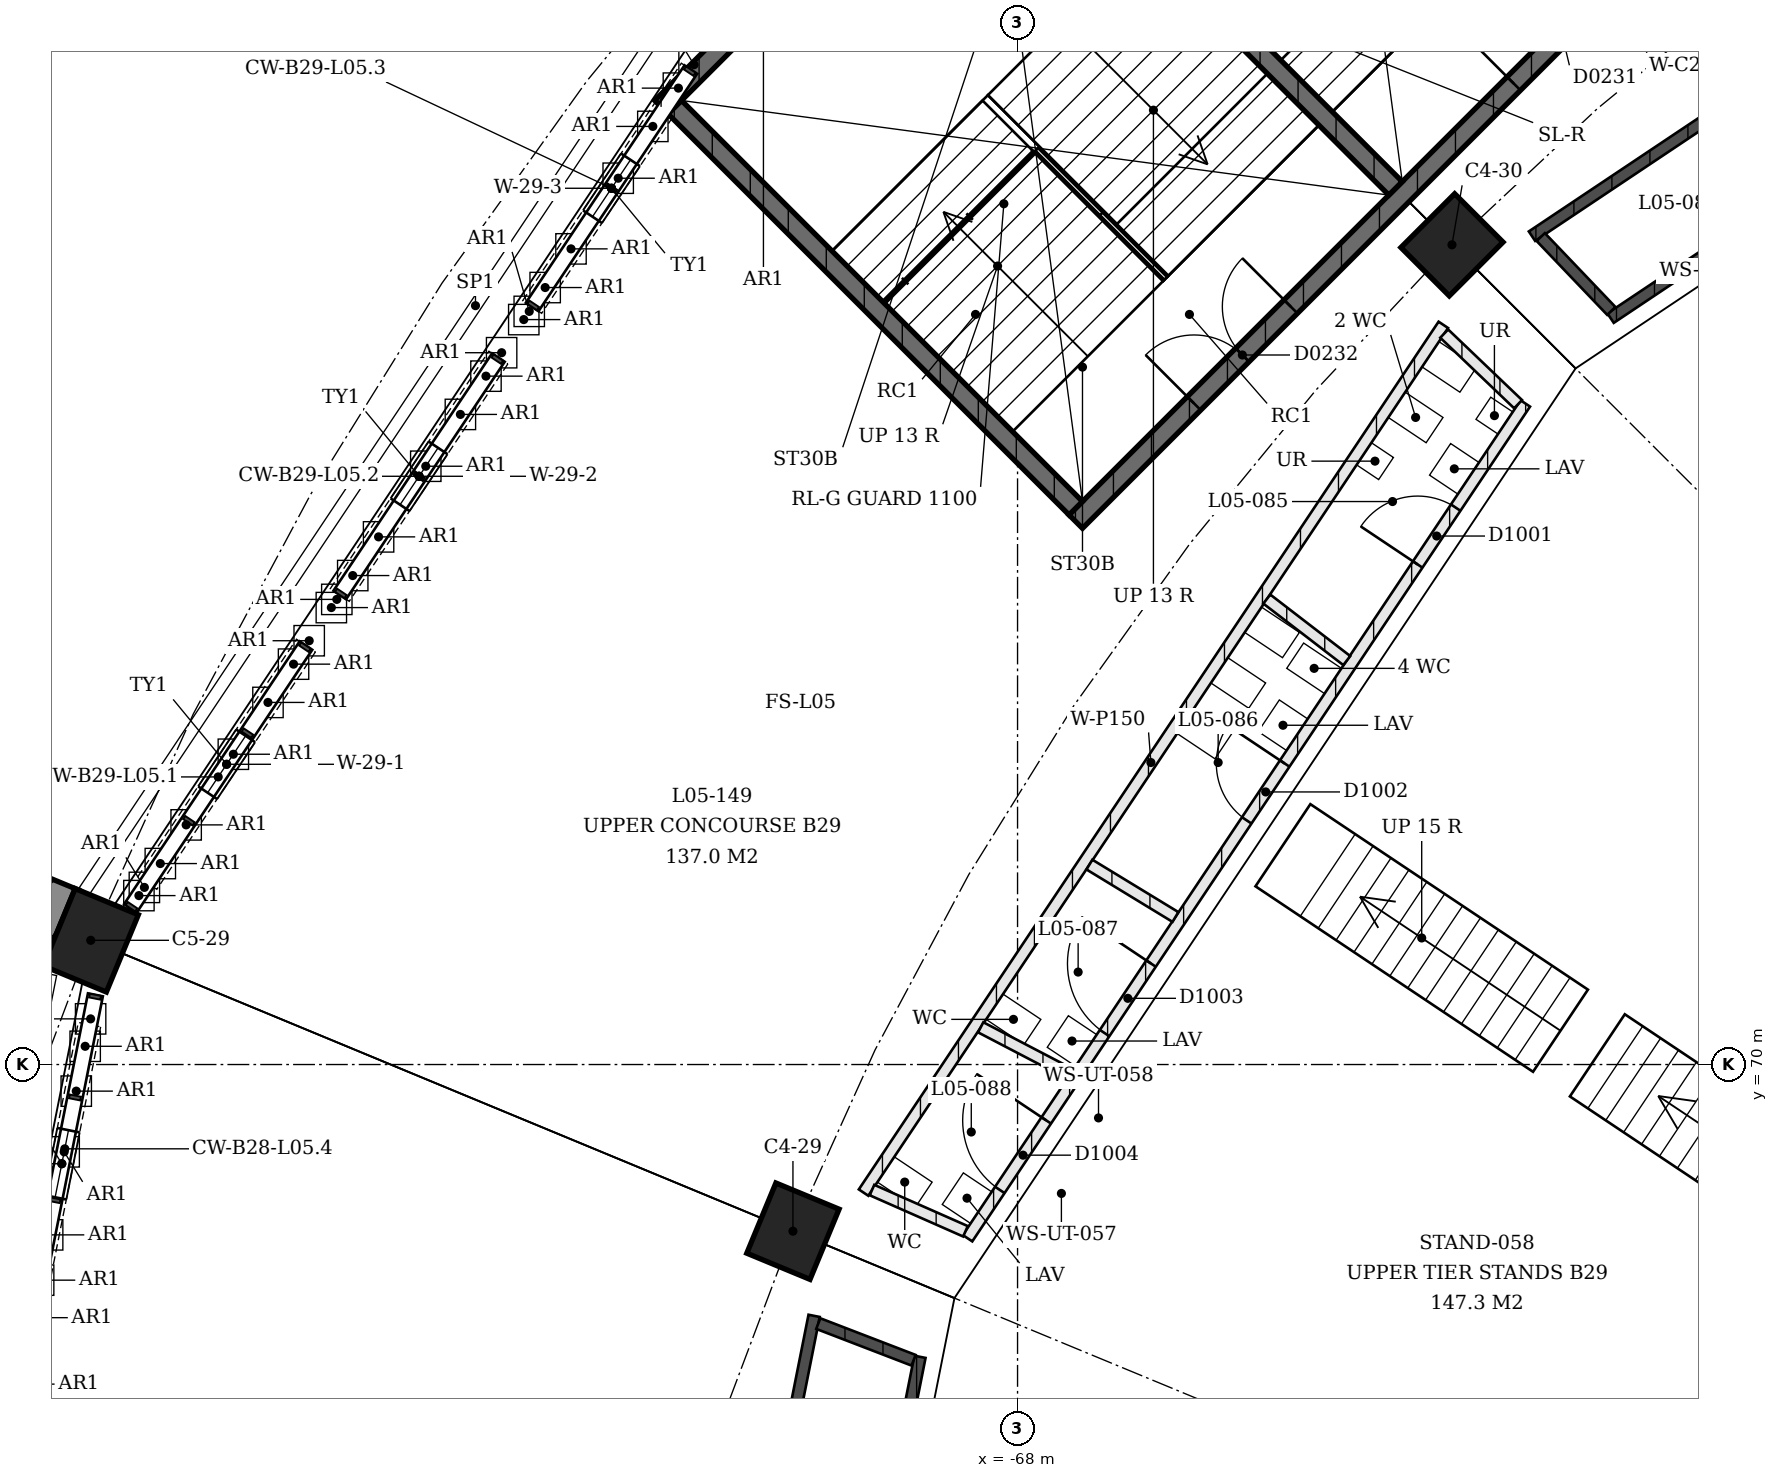
"""IFC4 building model, lengths in metres.
Left out: names, types, materials, properties, quantities, classifications, styles, units other than length and angle.
Written with IfcOpenShell. Run it as: python <this file> out.ifc"""

import sys

from ifc_helpers import new_model, si_unit, direction, frame, frame_2d, origin, origin_2d, place, context, subcontext, project, spatial, polyline, rectangle, outline, extrude, element, fill, save


model = new_model("IFC4")
c1 = context("Model", 3, precision=1e-05, world=origin(), true_north=direction((0.0, 1.0)))
c2 = subcontext(c1, "Body", "Model", "MODEL_VIEW")
j1 = project(units=[si_unit("LENGTHUNIT", "METRE"), si_unit("PLANEANGLEUNIT", "RADIAN")], contexts=[c1])
p1 = place(None, origin())
s1 = spatial("IfcSite", under=j1, at=p1, CompositionType="ELEMENT")
p2 = place(p1, origin())
s2 = spatial("IfcBuilding", under=s1, at=p2, CompositionType="ELEMENT")
p3 = place(p2, frame((0.0, 0.0, 22.5)))
s3 = spatial("IfcBuildingStorey", under=s2, at=p3, CompositionType="ELEMENT", Elevation=22.5)
p4 = place(p3, frame((-70.955, 67.807, 0.0), z_axis=(0.0, 0.0, 1.0), x_axis=(-0.382683432365, -0.923879532511, 0.0)))
e1 = element("IfcColumn", 1, at=p4, inside=s3, PredefinedType="COLUMN", context=c2, shape_type="SweptSolid", body=[
    extrude(rectangle(XDim=1.0, YDim=0.9, at=origin_2d()), origin(), (0.0, 0.0, 1.0), 6.5),
])
p5 = place(p3, frame((-80.194, 71.634, 0.0), z_axis=(0.0, 0.0, 1.0), x_axis=(-0.382683432365, -0.923879532511, 0.0)))
e2 = element("IfcColumn", 2, at=p5, inside=s3, PredefinedType="COLUMN", context=c2, shape_type="SweptSolid", body=[
    extrude(rectangle(XDim=1.1, YDim=0.9, at=origin_2d()), origin(), (0.0, 0.0, 1.0), 6.5),
])
p6 = place(p3, frame((-62.284, 80.784, 0.0), z_axis=(0.0, 0.0, 1.0), x_axis=(-0.707106781187, -0.707106781187, 0.0)))
e3 = element("IfcColumn", 3, at=p6, inside=s3, PredefinedType="COLUMN", context=c2, shape_type="SweptSolid", body=[
    extrude(rectangle(XDim=1.0, YDim=0.9, at=origin_2d()), origin(), (0.0, 0.0, 1.0), 6.5),
])
p7 = place(p3, frame((-80.939, 66.865, 4.1), z_axis=(0.0, 0.0, 1.0), x_axis=(0.19509691132, 0.980783969686, 0.0)))
e4 = element("IfcWall", 4, at=p7, inside=s3, PredefinedType="SOLIDWALL", context=c2, shape_type="SweptSolid", body=[
    extrude(outline(polyline([(0.0, 0.0), (3.732, 0.0), (3.732, 0.05), (3.61, 1.31), (3.249, 2.575), (2.661, 3.752), (1.866, 4.8), (1.071, 3.752), (0.483, 2.575), (0.122, 1.31), (0.0, 0.05), (0.0, 0.0)])), frame((0.0, 0.15, 0.0), z_axis=(0.0, -1.0, 0.0), x_axis=(1.0, 0.0, 0.0)), (0.0, 0.0, 1.0), 0.3),
])
p8 = place(p7, frame((1.416, 0.0, 0.4)))
e5 = element("IfcOpeningElement", 5, at=p8, cuts=e4, PredefinedType="OPENING", context=c2, shape_type="SweptSolid", body=[
    extrude(rectangle(XDim=0.9, YDim=3.6, at=frame_2d((0.45, 1.8))), frame((0.0, 0.16, 0.0), z_axis=(0.0, -1.0, 0.0), x_axis=(1.0, 0.0, 0.0)), (0.0, 0.0, 1.0), 0.32),
])
p9 = place(p3, frame((-79.45, 72.388, 4.1), z_axis=(0.0, 0.0, 1.0), x_axis=(0.555599628384, 0.831449970196, 0.0)))
e6 = element("IfcWall", 6, at=p9, inside=s3, PredefinedType="SOLIDWALL", context=c2, shape_type="SweptSolid", body=[
    extrude(outline(polyline([(0.0, 0.0), (3.757, 0.0), (3.757, 0.05), (3.635, 1.311), (3.271, 2.577), (2.678, 3.754), (1.879, 4.8), (1.079, 3.754), (0.486, 2.577), (0.123, 1.311), (0.0, 0.05), (0.0, 0.0)])), frame((0.0, 0.15, 0.0), z_axis=(0.0, -1.0, 0.0), x_axis=(1.0, 0.0, 0.0)), (0.0, 0.0, 1.0), 0.3),
])
p10 = place(p9, frame((1.428, 0.0, 0.4)))
e7 = element("IfcOpeningElement", 7, at=p10, cuts=e6, PredefinedType="OPENING", context=c2, shape_type="SweptSolid", body=[
    extrude(rectangle(XDim=0.9, YDim=3.6, at=frame_2d((0.45, 1.8))), frame((0.0, 0.16, 0.0), z_axis=(0.0, -1.0, 0.0), x_axis=(1.0, 0.0, 0.0)), (0.0, 0.0, 1.0), 0.32),
])
p11 = place(p3, frame((-76.918, 76.177, 4.1), z_axis=(0.0, 0.0, 1.0), x_axis=(0.555599628384, 0.831449970196, 0.0)))
e8 = element("IfcWall", 8, at=p11, inside=s3, PredefinedType="SOLIDWALL", context=c2, shape_type="SweptSolid", body=[
    extrude(outline(polyline([(0.0, 0.0), (3.757, 0.0), (3.757, 0.05), (3.635, 1.311), (3.271, 2.577), (2.678, 3.754), (1.879, 4.8), (1.079, 3.754), (0.486, 2.577), (0.123, 1.311), (0.0, 0.05), (0.0, 0.0)])), frame((0.0, 0.15, 0.0), z_axis=(0.0, -1.0, 0.0), x_axis=(1.0, 0.0, 0.0)), (0.0, 0.0, 1.0), 0.3),
])
p12 = place(p11, frame((1.428, 0.0, 0.4)))
e9 = element("IfcOpeningElement", 9, at=p12, cuts=e8, PredefinedType="OPENING", context=c2, shape_type="SweptSolid", body=[
    extrude(rectangle(XDim=0.9, YDim=3.6, at=frame_2d((0.45, 1.8))), frame((0.0, 0.16, 0.0), z_axis=(0.0, -1.0, 0.0), x_axis=(1.0, 0.0, 0.0)), (0.0, 0.0, 1.0), 0.32),
])
p13 = place(p3, frame((-74.386, 79.966, 4.1), z_axis=(0.0, 0.0, 1.0), x_axis=(0.555599628384, 0.831449970196, 0.0)))
e10 = element("IfcWall", 10, at=p13, inside=s3, PredefinedType="SOLIDWALL", context=c2, shape_type="SweptSolid", body=[
    extrude(outline(polyline([(0.0, 0.0), (3.757, 0.0), (3.757, 0.05), (3.635, 1.311), (3.271, 2.577), (2.678, 3.754), (1.879, 4.8), (1.079, 3.754), (0.486, 2.577), (0.123, 1.311), (0.0, 0.05), (0.0, 0.0)])), frame((0.0, 0.15, 0.0), z_axis=(0.0, -1.0, 0.0), x_axis=(1.0, 0.0, 0.0)), (0.0, 0.0, 1.0), 0.3),
])
p14 = place(p13, frame((1.428, 0.0, 0.4)))
e11 = element("IfcOpeningElement", 11, at=p14, cuts=e10, PredefinedType="OPENING", context=c2, shape_type="SweptSolid", body=[
    extrude(rectangle(XDim=0.9, YDim=3.6, at=frame_2d((0.45, 1.8))), frame((0.0, 0.16, 0.0), z_axis=(0.0, -1.0, 0.0), x_axis=(1.0, 0.0, 0.0)), (0.0, 0.0, 1.0), 0.32),
])
p15 = place(p3, frame((-58.643, 85.734, 0.0), z_axis=(0.0, 0.0, 1.0), x_axis=(-0.707106781187, -0.707106781187, 0.0)))
e12 = element("IfcWall", 12, at=p15, inside=s3, PredefinedType="SHEAR", context=c2, shape_type="SweptSolid", body=[
    extrude(rectangle(XDim=12.15, YDim=0.25, at=frame_2d((6.075, 0.0))), origin(), (0.0, 0.0, 1.0), 2.1),
])
p16 = place(p15, frame((2.2, 0.0, 0.0)))
e13 = element("IfcOpeningElement", 13, at=p16, cuts=e12, PredefinedType="OPENING", context=c2, shape_type="SweptSolid", body=[
    extrude(rectangle(XDim=1.8, YDim=2.1, at=frame_2d((0.9, 1.05))), frame((0.0, 0.125, 0.0), z_axis=(0.0, -1.0, 0.0), x_axis=(1.0, 0.0, 0.0)), (0.0, 0.0, 1.0), 0.25),
])
p17 = place(p15, frame((8.15, 0.0, 0.0)))
e14 = element("IfcOpeningElement", 14, at=p17, cuts=e12, PredefinedType="OPENING", context=c2, shape_type="SweptSolid", body=[
    extrude(rectangle(XDim=1.8, YDim=2.1, at=frame_2d((0.9, 1.05))), frame((0.0, 0.125, 0.0), z_axis=(0.0, -1.0, 0.0), x_axis=(1.0, 0.0, 0.0)), (0.0, 0.0, 1.0), 0.25),
])
p18 = place(p3, frame((-64.094, 91.186, 0.0), z_axis=(0.0, 0.0, 1.0), x_axis=(-0.707106781187, -0.707106781187, 0.0)))
e15 = element("IfcWall", 15, at=p18, inside=s3, PredefinedType="SHEAR", context=c2, shape_type="SweptSolid", body=[
    extrude(rectangle(XDim=12.15, YDim=0.25, at=frame_2d((6.075, 0.0))), origin(), (0.0, 0.0, 1.0), 2.1),
])
p19 = place(p3, frame((-67.234, 77.319, 0.0), z_axis=(0.0, 0.0, 1.0), x_axis=(-0.707090417709, 0.707123144286, 0.0)))
e16 = element("IfcWall", 16, at=p19, inside=s3, PredefinedType="SHEAR", context=c2, shape_type="SweptSolid", body=[
    extrude(rectangle(XDim=7.46, YDim=0.25, at=frame_2d((3.73, 0.0))), origin(), (0.0, 0.0, 1.0), 2.1),
])
p20 = place(p3, frame((-63.027, 81.527, 0.0), z_axis=(0.0, 0.0, 1.0), x_axis=(-0.707106781187, 0.707106781187, 0.0)))
e17 = element("IfcWall", 17, at=p20, inside=s3, PredefinedType="SHEAR", context=c2, shape_type="SweptSolid", body=[
    extrude(rectangle(XDim=7.46, YDim=0.25, at=frame_2d((3.73, 0.0))), origin(), (0.0, 0.0, 1.0), 2.1),
])
p21 = place(p3, frame((-71.842, 53.293, 0.0), z_axis=(0.0, 0.0, 1.0), x_axis=(0.195095631841, 0.980784224198, 0.0)))
e18 = element("IfcWall", 18, at=p21, inside=s3, PredefinedType="SOLIDWALL", context=c2, shape_type="SweptSolid", body=[
    extrude(rectangle(XDim=13.113, YDim=0.15, at=frame_2d((6.557, 0.0))), origin(), (0.0, 0.0, 1.0), 3.0),
])
p22 = place(p21, frame((2.815, 0.0, 0.0)))
e19 = element("IfcOpeningElement", 19, at=p22, cuts=e18, PredefinedType="OPENING", context=c2, shape_type="SweptSolid", body=[
    extrude(rectangle(XDim=1.0, YDim=2.1, at=frame_2d((0.5, 1.05))), frame((0.0, 0.075, 0.0), z_axis=(0.0, -1.0, 0.0), x_axis=(1.0, 0.0, 0.0)), (0.0, 0.0, 1.0), 0.15),
])
p23 = place(p21, frame((9.298, 0.0, 0.0)))
e20 = element("IfcOpeningElement", 20, at=p23, cuts=e18, PredefinedType="OPENING", context=c2, shape_type="SweptSolid", body=[
    extrude(rectangle(XDim=1.0, YDim=2.1, at=frame_2d((0.5, 1.05))), frame((0.0, 0.075, 0.0), z_axis=(0.0, -1.0, 0.0), x_axis=(1.0, 0.0, 0.0)), (0.0, 0.0, 1.0), 0.15),
])
p24 = place(p3, frame((-73.336, 53.325, 0.0), z_axis=(0.0, 0.0, 1.0), x_axis=(0.195086146928, 0.980786110871, 0.0)))
e21 = element("IfcWall", 21, at=p24, inside=s3, PredefinedType="SOLIDWALL", context=c2, shape_type="SweptSolid", body=[
    extrude(rectangle(XDim=13.631, YDim=0.15, at=frame_2d((6.815, 0.0))), origin(), (0.0, 0.0, 1.0), 3.0),
])
p25 = place(p3, frame((-69.368, 66.109, 0.0), z_axis=(0.0, 0.0, 1.0), x_axis=(-0.933331557443, 0.359015603953, 0.0)))
e22 = element("IfcWall", 22, at=p25, inside=s3, PredefinedType="SOLIDWALL", context=c2, shape_type="SweptSolid", body=[
    extrude(rectangle(XDim=1.344, YDim=0.15, at=frame_2d((0.672, 0.0))), origin(), (0.0, 0.0, 1.0), 3.0),
])
p26 = place(p3, frame((-61.32, 78.697, 0.0), z_axis=(0.0, 0.0, 1.0), x_axis=(-0.555570028225, -0.831469749142, 0.0)))
e23 = element("IfcWall", 23, at=p26, inside=s3, PredefinedType="PARTITIONING", context=c2, shape_type="SweptSolid", body=[
    extrude(rectangle(XDim=13.209, YDim=0.15, at=frame_2d((6.604, 0.0))), origin(), (0.0, 0.0, 1.0), 3.0),
])
p27 = place(p26, frame((1.648, 0.0, 0.0)))
e24 = element("IfcOpeningElement", 24, at=p27, cuts=e23, PredefinedType="OPENING", context=c2, shape_type="SweptSolid", body=[
    extrude(rectangle(XDim=0.9, YDim=2.1, at=frame_2d((0.45, 1.05))), frame((0.0, 0.075, 0.0), z_axis=(0.0, -1.0, 0.0), x_axis=(1.0, 0.0, 0.0)), (0.0, 0.0, 1.0), 0.15),
])
p28 = place(p26, frame((5.697, 0.0, 0.0)))
e25 = element("IfcOpeningElement", 25, at=p28, cuts=e23, PredefinedType="OPENING", context=c2, shape_type="SweptSolid", body=[
    extrude(rectangle(XDim=0.9, YDim=2.1, at=frame_2d((0.45, 1.05))), frame((0.0, 0.075, 0.0), z_axis=(0.0, -1.0, 0.0), x_axis=(1.0, 0.0, 0.0)), (0.0, 0.0, 1.0), 0.15),
])
p29 = place(p26, frame((8.863, 0.0, 0.0)))
e26 = element("IfcOpeningElement", 26, at=p29, cuts=e23, PredefinedType="OPENING", context=c2, shape_type="SweptSolid", body=[
    extrude(rectangle(XDim=1.1, YDim=2.1, at=frame_2d((0.55, 1.05))), frame((0.0, 0.075, 0.0), z_axis=(0.0, -1.0, 0.0), x_axis=(1.0, 0.0, 0.0)), (0.0, 0.0, 1.0), 0.15),
])
p30 = place(p26, frame((11.344, 0.0, 0.0)))
e27 = element("IfcOpeningElement", 27, at=p30, cuts=e23, PredefinedType="OPENING", context=c2, shape_type="SweptSolid", body=[
    extrude(rectangle(XDim=1.1, YDim=2.1, at=frame_2d((0.55, 1.05))), frame((0.0, 0.075, 0.0), z_axis=(0.0, -1.0, 0.0), x_axis=(1.0, 0.0, 0.0)), (0.0, 0.0, 1.0), 0.15),
])
p31 = place(p3, frame((-62.398, 79.731, 0.0), z_axis=(0.0, 0.0, 1.0), x_axis=(-0.555573905052, -0.831467158717, 0.0)))
e28 = element("IfcWall", 28, at=p31, inside=s3, PredefinedType="PARTITIONING", context=c2, shape_type="SweptSolid", body=[
    extrude(rectangle(XDim=13.73, YDim=0.15, at=frame_2d((6.865, 0.0))), origin(), (0.0, 0.0, 1.0), 3.0),
])
p32 = place(p3, frame((-61.414, 78.688, 0.0), z_axis=(0.0, 0.0, 1.0), x_axis=(-0.723174104738, 0.690665776072, 0.0)))
e29 = element("IfcWall", 29, at=p32, inside=s3, PredefinedType="PARTITIONING", context=c2, shape_type="SweptSolid", body=[
    extrude(rectangle(XDim=1.344, YDim=0.15, at=frame_2d((0.672, 0.0))), origin(), (0.0, 0.0, 1.0), 3.0),
])
p33 = place(p3, frame((-63.668, 75.314, 0.0), z_axis=(0.0, 0.0, 1.0), x_axis=(-0.792767594219, 0.609524028695, 0.0)))
e30 = element("IfcWall", 30, at=p33, inside=s3, PredefinedType="PARTITIONING", context=c2, shape_type="SweptSolid", body=[
    extrude(rectangle(XDim=1.327, YDim=0.15, at=frame_2d((0.664, 0.0))), origin(), (0.0, 0.0, 1.0), 3.0),
])
p34 = place(p3, frame((-65.922, 71.941, 0.0), z_axis=(0.0, 0.0, 1.0), x_axis=(-0.854109602484, 0.520093056043, 0.0)))
e31 = element("IfcWall", 31, at=p34, inside=s3, PredefinedType="PARTITIONING", context=c2, shape_type="SweptSolid", body=[
    extrude(rectangle(XDim=1.325, YDim=0.15, at=frame_2d((0.663, 0.0))), origin(), (0.0, 0.0, 1.0), 3.0),
])
p35 = place(p3, frame((-67.304, 69.874, 0.0), z_axis=(0.0, 0.0, 1.0), x_axis=(-0.886633867097, 0.462472037768, 0.0)))
e32 = element("IfcWall", 32, at=p35, inside=s3, PredefinedType="PARTITIONING", context=c2, shape_type="SweptSolid", body=[
    extrude(rectangle(XDim=1.332, YDim=0.15, at=frame_2d((0.666, 0.0))), origin(), (0.0, 0.0, 1.0), 3.0),
])
p36 = place(p3, frame((-68.685, 67.806, 0.0), z_axis=(0.0, 0.0, 1.0), x_axis=(-0.914894130368, 0.403693857048, 0.0)))
e33 = element("IfcWall", 33, at=p36, inside=s3, PredefinedType="PARTITIONING", context=c2, shape_type="SweptSolid", body=[
    extrude(rectangle(XDim=1.344, YDim=0.15, at=frame_2d((0.672, 0.0))), origin(), (0.0, 0.0, 1.0), 3.0),
])
p37 = place(p3, frame((-60.197, 79.82, 0.0), z_axis=(0.0, 0.0, 1.0), x_axis=(0.831471244595, 0.555567790114, 0.0)))
e34 = element("IfcWall", 34, at=p37, inside=s3, PredefinedType="SOLIDWALL", context=c2, shape_type="SweptSolid", body=[
    extrude(rectangle(XDim=13.113, YDim=0.15, at=frame_2d((6.557, 0.0))), origin(), (0.0, 0.0, 1.0), 3.0),
])
p38 = place(p37, frame((2.815, 0.0, 0.0)))
e35 = element("IfcOpeningElement", 35, at=p38, cuts=e34, PredefinedType="OPENING", context=c2, shape_type="SweptSolid", body=[
    extrude(rectangle(XDim=1.0, YDim=2.1, at=frame_2d((0.5, 1.05))), frame((0.0, 0.075, 0.0), z_axis=(0.0, -1.0, 0.0), x_axis=(1.0, 0.0, 0.0)), (0.0, 0.0, 1.0), 0.15),
])
p39 = place(p37, frame((9.298, 0.0, 0.0)))
e36 = element("IfcOpeningElement", 36, at=p39, cuts=e34, PredefinedType="OPENING", context=c2, shape_type="SweptSolid", body=[
    extrude(rectangle(XDim=1.0, YDim=2.1, at=frame_2d((0.5, 1.05))), frame((0.0, 0.075, 0.0), z_axis=(0.0, -1.0, 0.0), x_axis=(1.0, 0.0, 0.0)), (0.0, 0.0, 1.0), 0.15),
])
p40 = place(p3, frame((-61.231, 80.898, 0.0), z_axis=(0.0, 0.0, 1.0), x_axis=(0.831471173823, 0.555567896033, 0.0)))
e37 = element("IfcWall", 37, at=p40, inside=s3, PredefinedType="SOLIDWALL", context=c2, shape_type="SweptSolid", body=[
    extrude(rectangle(XDim=13.631, YDim=0.15, at=frame_2d((6.815, 0.0))), origin(), (0.0, 0.0, 1.0), 3.0),
])
p41 = place(p3, frame((-60.188, 79.914, 0.0), z_axis=(0.0, 0.0, 1.0), x_axis=(-0.690665776072, 0.723174104738, 0.0)))
e38 = element("IfcWall", 38, at=p41, inside=s3, PredefinedType="SOLIDWALL", context=c2, shape_type="SweptSolid", body=[
    extrude(rectangle(XDim=1.344, YDim=0.15, at=frame_2d((0.672, 0.0))), origin(), (0.0, 0.0, 1.0), 3.0),
])
p42 = place(p8, origin())
e39 = element("IfcWindow", 39, at=p42, inside=s3, PartitioningType="SINGLE_PANEL", PredefinedType="WINDOW", context=c2, shape_type="SweptSolid", body=[
    extrude(rectangle(XDim=0.9, YDim=3.6, at=frame_2d((0.45, 1.8))), frame((0.0, 0.03, 0.0), z_axis=(0.0, -1.0, 0.0), x_axis=(1.0, 0.0, 0.0)), (0.0, 0.0, 1.0), 0.06),
])
fill(e5, e39)
p43 = place(p10, origin())
e40 = element("IfcWindow", 40, at=p43, inside=s3, PartitioningType="SINGLE_PANEL", PredefinedType="WINDOW", context=c2, shape_type="SweptSolid", body=[
    extrude(rectangle(XDim=0.9, YDim=3.6, at=frame_2d((0.45, 1.8))), frame((0.0, 0.03, 0.0), z_axis=(0.0, -1.0, 0.0), x_axis=(1.0, 0.0, 0.0)), (0.0, 0.0, 1.0), 0.06),
])
fill(e7, e40)
p44 = place(p12, origin())
e41 = element("IfcWindow", 41, at=p44, inside=s3, PartitioningType="SINGLE_PANEL", PredefinedType="WINDOW", context=c2, shape_type="SweptSolid", body=[
    extrude(rectangle(XDim=0.9, YDim=3.6, at=frame_2d((0.45, 1.8))), frame((0.0, 0.03, 0.0), z_axis=(0.0, -1.0, 0.0), x_axis=(1.0, 0.0, 0.0)), (0.0, 0.0, 1.0), 0.06),
])
fill(e9, e41)
p45 = place(p14, origin())
e42 = element("IfcWindow", 42, at=p45, inside=s3, PartitioningType="SINGLE_PANEL", PredefinedType="WINDOW", context=c2, shape_type="SweptSolid", body=[
    extrude(rectangle(XDim=0.9, YDim=3.6, at=frame_2d((0.45, 1.8))), frame((0.0, 0.03, 0.0), z_axis=(0.0, -1.0, 0.0), x_axis=(1.0, 0.0, 0.0)), (0.0, 0.0, 1.0), 0.06),
])
fill(e11, e42)
p46 = place(p16, origin())
e43 = element("IfcDoor", 43, at=p46, inside=s3, OperationType="DOUBLE_DOOR_SINGLE_SWING", PredefinedType="DOOR", context=c2, shape_type="SweptSolid", body=[
    extrude(rectangle(XDim=1.8, YDim=2.1, at=frame_2d((0.9, 1.05))), frame((0.0, 0.025, 0.0), z_axis=(0.0, -1.0, 0.0), x_axis=(1.0, 0.0, 0.0)), (0.0, 0.0, 1.0), 0.05),
])
fill(e13, e43)
p47 = place(p17, origin())
e44 = element("IfcDoor", 44, at=p47, inside=s3, OperationType="DOUBLE_DOOR_SINGLE_SWING", PredefinedType="DOOR", context=c2, shape_type="SweptSolid", body=[
    extrude(rectangle(XDim=1.8, YDim=2.1, at=frame_2d((0.9, 1.05))), frame((0.0, 0.025, 0.0), z_axis=(0.0, -1.0, 0.0), x_axis=(1.0, 0.0, 0.0)), (0.0, 0.0, 1.0), 0.05),
])
fill(e14, e44)
p48 = place(p27, origin())
e45 = element("IfcDoor", 45, at=p48, inside=s3, OperationType="SINGLE_SWING_RIGHT", PredefinedType="DOOR", context=c2, shape_type="SweptSolid", body=[
    extrude(rectangle(XDim=0.9, YDim=2.1, at=frame_2d((0.45, 1.05))), frame((0.0, 0.025, 0.0), z_axis=(0.0, -1.0, 0.0), x_axis=(1.0, 0.0, 0.0)), (0.0, 0.0, 1.0), 0.05),
])
fill(e24, e45)
p49 = place(p28, origin())
e46 = element("IfcDoor", 46, at=p49, inside=s3, OperationType="SINGLE_SWING_LEFT", PredefinedType="DOOR", context=c2, shape_type="SweptSolid", body=[
    extrude(rectangle(XDim=0.9, YDim=2.1, at=frame_2d((0.45, 1.05))), frame((0.0, 0.025, 0.0), z_axis=(0.0, -1.0, 0.0), x_axis=(1.0, 0.0, 0.0)), (0.0, 0.0, 1.0), 0.05),
])
fill(e25, e46)
p50 = place(p29, origin())
e47 = element("IfcDoor", 47, at=p50, inside=s3, OperationType="SINGLE_SWING_LEFT", PredefinedType="DOOR", context=c2, shape_type="SweptSolid", body=[
    extrude(rectangle(XDim=1.1, YDim=2.1, at=frame_2d((0.55, 1.05))), frame((0.0, 0.025, 0.0), z_axis=(0.0, -1.0, 0.0), x_axis=(1.0, 0.0, 0.0)), (0.0, 0.0, 1.0), 0.05),
])
fill(e26, e47)
p51 = place(p30, origin())
e48 = element("IfcDoor", 48, at=p51, inside=s3, OperationType="SINGLE_SWING_LEFT", PredefinedType="DOOR", context=c2, shape_type="SweptSolid", body=[
    extrude(rectangle(XDim=1.1, YDim=2.1, at=frame_2d((0.55, 1.05))), frame((0.0, 0.025, 0.0), z_axis=(0.0, -1.0, 0.0), x_axis=(1.0, 0.0, 0.0)), (0.0, 0.0, 1.0), 0.05),
])
fill(e27, e48)
save(model, sys.argv[1])
